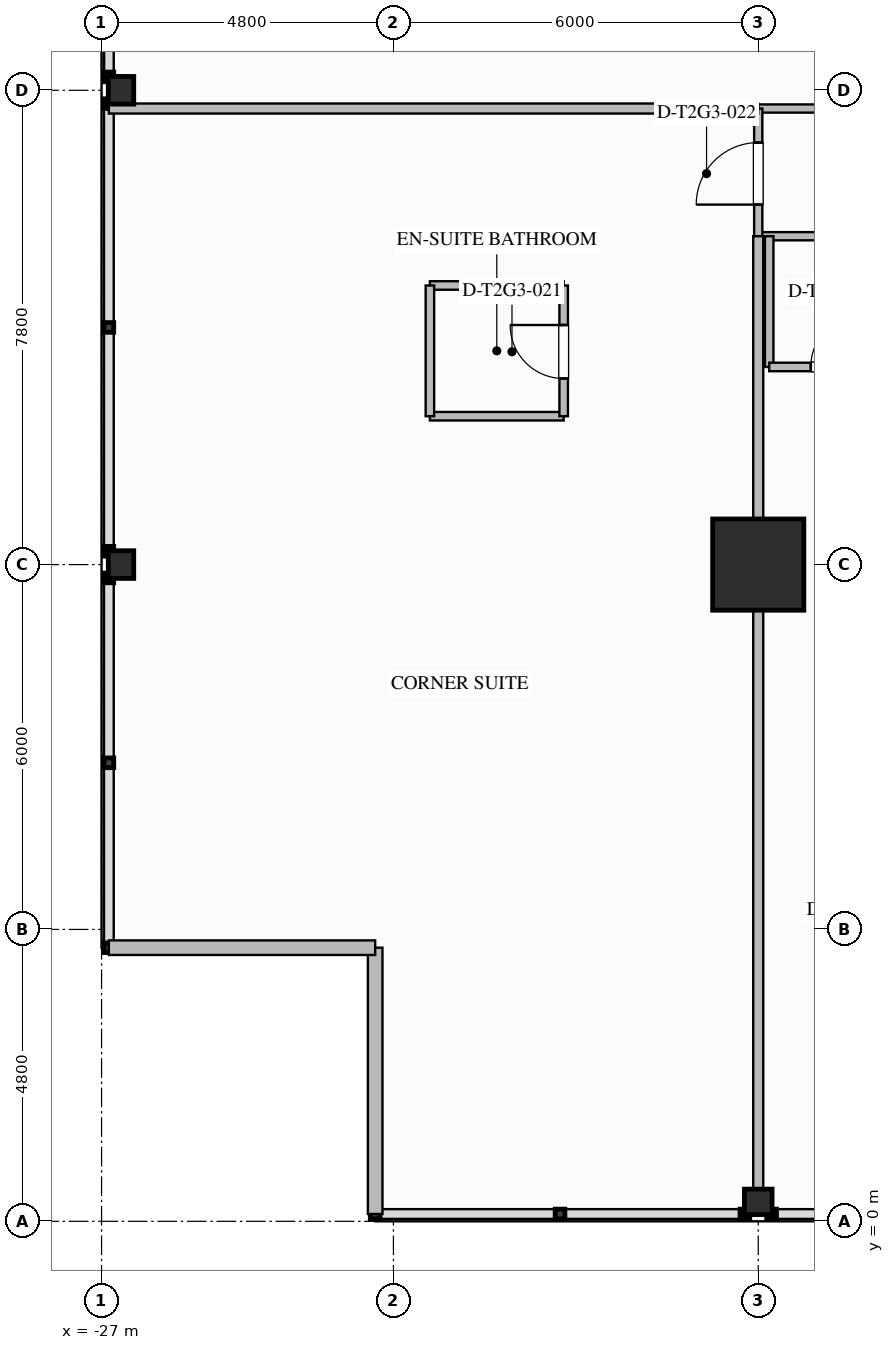
"""IFC4 building model, lengths in metres.
Left out: names, types, materials, properties, quantities, classifications, styles, units other than length and angle.
Written with IfcOpenShell. Run it as: python <this file> out.ifc"""

import sys

from ifc_helpers import new_model, si_unit, direction, frame, frame_2d, origin, origin_2d, place, context, subcontext, project, spatial, rectangle, i_section, extrude, element, fill, save


model = new_model("IFC4")
c1 = context("Model", 3, precision=1e-05, world=origin(), true_north=direction((0.0, 1.0)))
c2 = subcontext(c1, "Body", "Model", "MODEL_VIEW")
j1 = project(units=[si_unit("LENGTHUNIT", "METRE"), si_unit("PLANEANGLEUNIT", "RADIAN")], contexts=[c1])
p1 = place(None, origin())
s1 = spatial("IfcSite", under=j1, at=p1, CompositionType="ELEMENT")
p2 = place(p1, origin())
s2 = spatial("IfcBuilding", under=s1, at=p2, CompositionType="ELEMENT")
p3 = place(p2, frame((0.0, 0.0, 112.8)))
s3 = spatial("IfcBuildingStorey", under=s2, at=p3, CompositionType="ELEMENT", Elevation=112.8)
p4 = place(p3, frame((-16.2, 10.8, 0.0), z_axis=(0.0, 0.0, 1.0), x_axis=(1.0, 0.0, 0.0)))
e1 = element("IfcColumn", 1, at=p4, inside=s3, PredefinedType="COLUMN", context=c2, shape_type="SweptSolid", body=[
    extrude(rectangle(XDim=1.5, YDim=1.5, at=origin_2d()), origin(), (0.0, 0.0, 1.0), 3.5),
])
for number, where, z_axis, x_axis in (
    (2, (-26.68, 10.8, 0.0), (0.0, 0.0, 1.0), (1.0, 0.0, 0.0)),
    (3, (-26.68, 18.6, 0.0), (0.0, 0.0, 1.0), (1.0, 0.0, 0.0)),
    (4, (-16.2, 0.32, 0.0), (0.0, 0.0, 1.0), (0.0, 1.0, 0.0)),
):
    element("IfcColumn", number, at=place(p3, frame(where, z_axis=z_axis, x_axis=x_axis)), inside=s3, PredefinedType="COLUMN", context=c2, shape_type="SweptSolid", body=[
        extrude(i_section(OverallWidth=0.418, OverallDepth=0.455, WebThickness=0.042, FlangeThickness=0.068, FilletRadius=0.03, at=origin_2d()), origin(), (0.0, 0.0, 1.0), 3.497),
    ])
for number, where, z_axis, x_axis in (
    (5, (-22.5, 0.12, 0.0), (0.0, 0.0, 1.0), (0.0, 1.0, 0.0)),
    (6, (-22.5, 4.5, 0.0), (0.0, 0.0, 1.0), (-1.0, 0.0, 0.0)),
):
    element("IfcWall", number, at=place(p3, frame(where, z_axis=z_axis, x_axis=x_axis)), inside=s3, PredefinedType="STANDARD", context=c2, shape_type="SweptSolid", body=[
        extrude(rectangle(XDim=4.38, YDim=0.24, at=frame_2d((2.19, 0.0))), origin(), (0.0, 0.0, 1.0), 3.24),
    ])
p5 = place(p3, frame((-16.2, 18.3, 0.0), z_axis=(0.0, 0.0, 1.0), x_axis=(1.0, 0.0, 0.0)))
e7 = element("IfcWall", 7, at=p5, inside=s3, PredefinedType="PARTITIONING", context=c2, shape_type="SweptSolid", body=[
    extrude(rectangle(XDim=5.4, YDim=0.135, at=frame_2d((2.7, 0.0))), origin(), (0.0, 0.0, 1.0), 3.24),
])
p6 = place(p3, frame((-16.2, 16.2, 0.0), z_axis=(0.0, 0.0, 1.0), x_axis=(1.0, 0.0, 0.0)))
e8 = element("IfcWall", 8, at=p6, inside=s3, PredefinedType="PARTITIONING", context=c2, shape_type="SweptSolid", body=[
    extrude(rectangle(XDim=24.9, YDim=0.135, at=frame_2d((12.45, 0.0))), origin(), (0.0, 0.0, 1.0), 3.24),
])
p7 = place(p6, frame((3.225, 0.0, 0.0)))
e9 = element("IfcOpeningElement", 9, at=p7, cuts=e8, PredefinedType="OPENING", context=c2, shape_type="SweptSolid", body=[
    extrude(rectangle(XDim=0.96, YDim=2.15, at=frame_2d((0.48, 1.075))), frame((0.0, 0.077, 0.0), z_axis=(0.0, -1.0, 0.0), x_axis=(1.0, 0.0, 0.0)), (0.0, 0.0, 1.0), 0.155),
])
p8 = place(p6, frame((8.205, 0.0, 0.0)))
e10 = element("IfcOpeningElement", 10, at=p8, cuts=e8, PredefinedType="OPENING", context=c2, shape_type="SweptSolid", body=[
    extrude(rectangle(XDim=1.02, YDim=2.15, at=frame_2d((0.51, 1.075))), frame((0.0, 0.077, 0.0), z_axis=(0.0, -1.0, 0.0), x_axis=(1.0, 0.0, 0.0)), (0.0, 0.0, 1.0), 0.155),
])
p9 = place(p6, frame((15.774, 0.0, 0.0)))
e11 = element("IfcOpeningElement", 11, at=p9, cuts=e8, PredefinedType="OPENING", context=c2, shape_type="SweptSolid", body=[
    extrude(rectangle(XDim=1.26, YDim=2.2, at=frame_2d((0.63, 1.1))), frame((0.0, 0.077, 0.0), z_axis=(0.0, -1.0, 0.0), x_axis=(1.0, 0.0, 0.0)), (0.0, 0.0, 1.0), 0.155),
])
p10 = place(p6, frame((20.904, 0.0, 0.0)))
e12 = element("IfcOpeningElement", 12, at=p10, cuts=e8, PredefinedType="OPENING", context=c2, shape_type="SweptSolid", body=[
    extrude(rectangle(XDim=1.02, YDim=2.15, at=frame_2d((0.51, 1.075))), frame((0.0, 0.077, 0.0), z_axis=(0.0, -1.0, 0.0), x_axis=(1.0, 0.0, 0.0)), (0.0, 0.0, 1.0), 0.155),
])
p11 = place(p3, frame((-16.2, 16.2, 0.0), z_axis=(0.0, 0.0, 1.0), x_axis=(0.0, 1.0, 0.0)))
e13 = element("IfcWall", 13, at=p11, inside=s3, PredefinedType="PARTITIONING", context=c2, shape_type="SweptSolid", body=[
    extrude(rectangle(XDim=2.1, YDim=0.135, at=frame_2d((1.05, 0.0))), origin(), (0.0, 0.0, 1.0), 2.452),
])
p12 = place(p11, frame((0.52, 0.0, 0.0)))
e14 = element("IfcOpeningElement", 14, at=p12, cuts=e13, PredefinedType="OPENING", context=c2, shape_type="SweptSolid", body=[
    extrude(rectangle(XDim=1.02, YDim=2.15, at=frame_2d((0.51, 1.075))), frame((0.0, 0.077, 0.0), z_axis=(0.0, -1.0, 0.0), x_axis=(1.0, 0.0, 0.0)), (0.0, 0.0, 1.0), 0.155),
])
p13 = place(p3, frame((-16.2, 0.12, 0.0), z_axis=(0.0, 0.0, 1.0), x_axis=(0.0, 1.0, 0.0)))
e15 = element("IfcWall", 15, at=p13, inside=s3, PredefinedType="PARTITIONING", context=c2, shape_type="SweptSolid", body=[
    extrude(rectangle(XDim=16.08, YDim=0.165, at=frame_2d((8.04, 0.0))), origin(), (0.0, 0.0, 1.0), 2.452),
])
p14 = place(p3, frame((-26.88, 18.3, 0.0), z_axis=(0.0, 0.0, 1.0), x_axis=(1.0, 0.0, 0.0)))
e16 = element("IfcWall", 16, at=p14, inside=s3, PredefinedType="PARTITIONING", context=c2, shape_type="SweptSolid", body=[
    extrude(rectangle(XDim=10.68, YDim=0.165, at=frame_2d((5.34, 0.0))), origin(), (0.0, 0.0, 1.0), 2.452),
])
for number, where, z_axis, x_axis in (
    (17, (-21.6, 13.24, 0.0), (0.0, 0.0, 1.0), (1.0, 0.0, 0.0)),
    (18, (-21.6, 15.39, 0.0), (0.0, 0.0, 1.0), (1.0, 0.0, 0.0)),
):
    element("IfcWall", number, at=place(p3, frame(where, z_axis=z_axis, x_axis=x_axis)), inside=s3, PredefinedType="PLUMBINGWALL", context=c2, shape_type="SweptSolid", body=[
        extrude(rectangle(XDim=2.2, YDim=0.14, at=frame_2d((1.1, 0.0))), origin(), (0.0, 0.0, 1.0), 3.24),
    ])
p15 = place(p3, frame((-21.6, 13.24, 0.0), z_axis=(0.0, 0.0, 1.0), x_axis=(0.0, 1.0, 0.0)))
e19 = element("IfcWall", 19, at=p15, inside=s3, PredefinedType="PLUMBINGWALL", context=c2, shape_type="SweptSolid", body=[
    extrude(rectangle(XDim=2.15, YDim=0.14, at=frame_2d((1.075, 0.0))), origin(), (0.0, 0.0, 1.0), 3.24),
])
p16 = place(p3, frame((-19.4, 13.24, 0.0), z_axis=(0.0, 0.0, 1.0), x_axis=(0.0, 1.0, 0.0)))
e20 = element("IfcWall", 20, at=p16, inside=s3, PredefinedType="PLUMBINGWALL", context=c2, shape_type="SweptSolid", body=[
    extrude(rectangle(XDim=2.15, YDim=0.14, at=frame_2d((1.075, 0.0))), origin(), (0.0, 0.0, 1.0), 3.24),
])
p17 = place(p16, frame((0.62, 0.0, 0.0)))
e21 = element("IfcOpeningElement", 21, at=p17, cuts=e20, PredefinedType="OPENING", context=c2, shape_type="SweptSolid", body=[
    extrude(rectangle(XDim=0.88, YDim=2.1, at=frame_2d((0.44, 1.05))), frame((0.0, 0.08, 0.0), z_axis=(0.0, -1.0, 0.0), x_axis=(1.0, 0.0, 0.0)), (0.0, 0.0, 1.0), 0.16),
])
p18 = place(p3, frame((-16.02, 16.2, 0.0), z_axis=(0.0, 0.0, 1.0), x_axis=(0.0, -1.0, 0.0)))
e22 = element("IfcWall", 22, at=p18, inside=s3, PredefinedType="PLUMBINGWALL", context=c2, shape_type="SweptSolid", body=[
    extrude(rectangle(XDim=2.15, YDim=0.14, at=frame_2d((1.075, 0.0))), origin(), (0.0, 0.0, 1.0), 2.452),
])
p19 = place(p3, frame((-16.02, 14.05, 0.0), z_axis=(0.0, 0.0, 1.0), x_axis=(1.0, 0.0, 0.0)))
e23 = element("IfcWall", 23, at=p19, inside=s3, PredefinedType="PLUMBINGWALL", context=c2, shape_type="SweptSolid", body=[
    extrude(rectangle(XDim=2.25, YDim=0.14, at=frame_2d((1.125, 0.0))), origin(), (0.0, 0.0, 1.0), 3.24),
])
p20 = place(p19, frame((0.685, 0.0, 0.0)))
e24 = element("IfcOpeningElement", 24, at=p20, cuts=e23, PredefinedType="OPENING", context=c2, shape_type="SweptSolid", body=[
    extrude(rectangle(XDim=0.88, YDim=2.1, at=frame_2d((0.44, 1.05))), frame((0.0, 0.08, 0.0), z_axis=(0.0, -1.0, 0.0), x_axis=(1.0, 0.0, 0.0)), (0.0, 0.0, 1.0), 0.16),
])
p21 = place(p17, origin())
e25 = element("IfcDoor", 25, at=p21, inside=s3, OperationType="SINGLE_SWING_RIGHT", PredefinedType="DOOR", context=c2, shape_type="SweptSolid", body=[
    extrude(rectangle(XDim=0.88, YDim=2.1, at=frame_2d((0.44, 1.05))), frame((0.0, 0.025, 0.0), z_axis=(0.0, -1.0, 0.0), x_axis=(1.0, 0.0, 0.0)), (0.0, 0.0, 1.0), 0.05),
])
fill(e21, e25)
p22 = place(p12, origin())
e26 = element("IfcDoor", 26, at=p22, inside=s3, OperationType="SINGLE_SWING_LEFT", PredefinedType="DOOR", context=c2, shape_type="SweptSolid", body=[
    extrude(rectangle(XDim=1.02, YDim=2.15, at=frame_2d((0.51, 1.075))), frame((0.0, 0.025, 0.0), z_axis=(0.0, -1.0, 0.0), x_axis=(1.0, 0.0, 0.0)), (0.0, 0.0, 1.0), 0.05),
])
fill(e14, e26)
p23 = place(p20, origin())
e27 = element("IfcDoor", 27, at=p23, inside=s3, OperationType="SINGLE_SWING_RIGHT", PredefinedType="DOOR", context=c2, shape_type="SweptSolid", body=[
    extrude(rectangle(XDim=0.88, YDim=2.1, at=frame_2d((0.44, 1.05))), frame((0.0, 0.025, 0.0), z_axis=(0.0, -1.0, 0.0), x_axis=(1.0, 0.0, 0.0)), (0.0, 0.0, 1.0), 0.05),
])
fill(e24, e27)
save(model, sys.argv[1])
